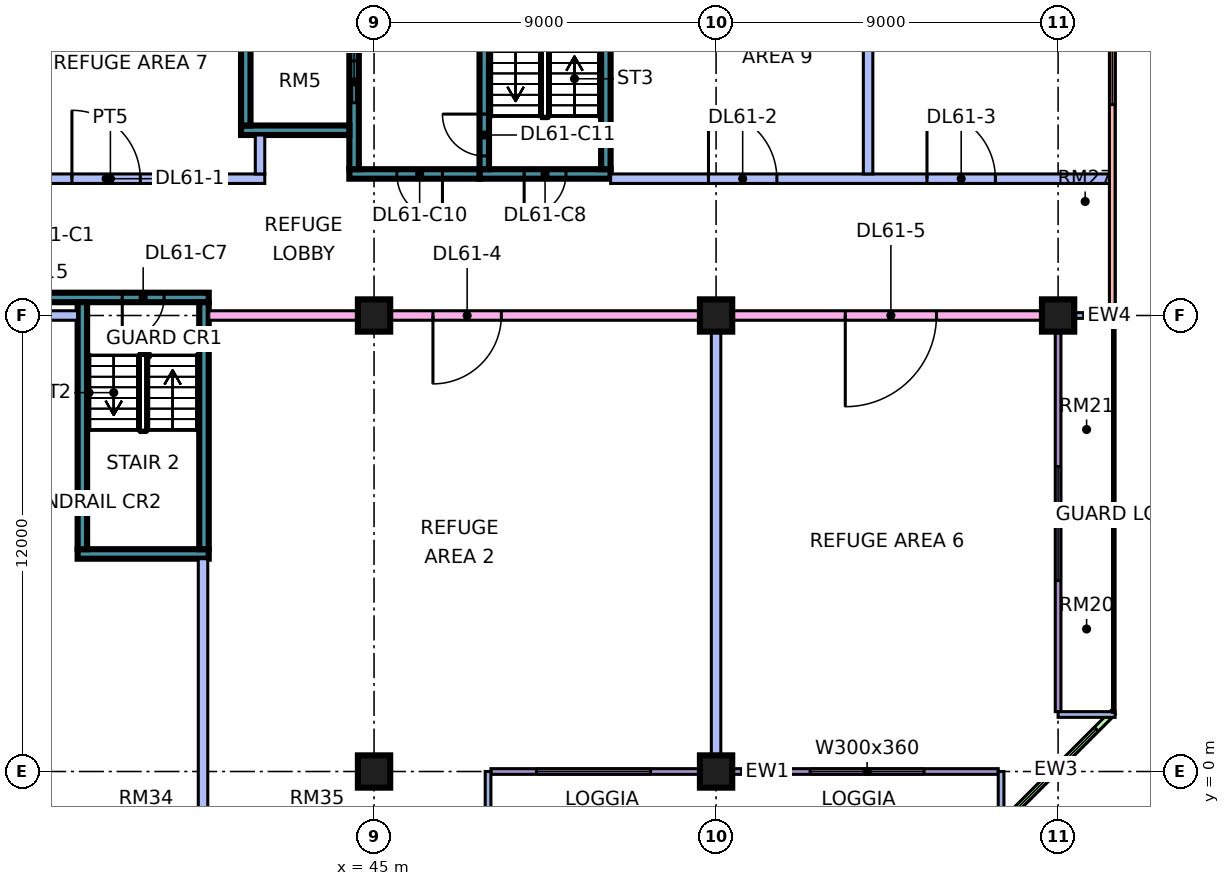
"""IFC4 building model, lengths in metres.
Left out: names, types, materials, properties, quantities, classifications, styles, units other than length and angle.
Written with IfcOpenShell. Run it as: python <this file> out.ifc"""

import sys

from ifc_helpers import new_model, si_unit, direction, frame, frame_2d, origin, origin_2d, place, context, subcontext, project, spatial, rectangle, extrude, element, fill, save


model = new_model("IFC4")
c1 = context("Model", 3, precision=1e-05, world=origin(), true_north=direction((0.0, 1.0)))
c2 = subcontext(c1, "Body", "Model", "MODEL_VIEW")
j1 = project(units=[si_unit("LENGTHUNIT", "METRE"), si_unit("PLANEANGLEUNIT", "RADIAN")], contexts=[c1])
p1 = place(None, origin())
s1 = spatial("IfcSite", under=j1, at=p1, CompositionType="ELEMENT")
p2 = place(p1, origin())
s2 = spatial("IfcBuilding", under=s1, at=p2, CompositionType="ELEMENT")
p3 = place(p2, frame((0.0, 0.0, 256.65)))
s3 = spatial("IfcBuildingStorey", under=s2, at=p3, CompositionType="ELEMENT", Elevation=256.65)
for number, where, z_axis, x_axis in (
    (1, (45.0, 0.0, 0.0), (0.0, 0.0, 1.0), (1.0, 0.0, 0.0)),
    (2, (45.0, 12.0, 0.0), (0.0, 0.0, 1.0), (1.0, 0.0, 0.0)),
    (3, (54.0, 0.0, 0.0), (0.0, 0.0, 1.0), (1.0, 0.0, 0.0)),
    (4, (54.0, 12.0, 0.0), (0.0, 0.0, 1.0), (1.0, 0.0, 0.0)),
    (5, (63.0, 12.0, 0.0), (0.0, 0.0, 1.0), (1.0, 0.0, 0.0)),
):
    element("IfcColumn", number, at=place(p3, frame(where, z_axis=z_axis, x_axis=x_axis)), inside=s3, PredefinedType="COLUMN", context=c2, shape_type="SweptSolid", body=[
        extrude(rectangle(XDim=0.85, YDim=0.85, at=origin_2d()), origin(), (0.0, 0.0, 1.0), 5.5),
    ])
p4 = place(p3, frame((37.2, 5.725, 0.0), z_axis=(0.0, 0.0, 1.0), x_axis=(1.0, 0.0, 0.0)))
e6 = element("IfcWall", 6, at=p4, inside=s3, PredefinedType="SHEAR", context=c2, shape_type="SweptSolid", body=[
    extrude(rectangle(XDim=3.45, YDim=0.25, at=frame_2d((1.725, 0.0))), origin(), (0.0, 0.0, 1.0), 5.5),
])
p5 = place(p3, frame((36.425, 12.475, 0.0), z_axis=(0.0, 0.0, 1.0), x_axis=(1.0, 0.0, 0.0)))
e7 = element("IfcWall", 7, at=p5, inside=s3, PredefinedType="SHEAR", context=c2, shape_type="SweptSolid", body=[
    extrude(rectangle(XDim=4.225, YDim=0.25, at=frame_2d((2.112, 0.0))), origin(), (0.0, 0.0, 1.0), 5.5),
])
p6 = place(p5, frame((1.95, 0.0, 0.0)))
e8 = element("IfcOpeningElement", 8, at=p6, cuts=e7, PredefinedType="OPENING", context=c2, shape_type="SweptSolid", body=[
    extrude(rectangle(XDim=1.1, YDim=2.2, at=frame_2d((0.55, 1.1))), frame((0.0, 0.135, 0.0), z_axis=(0.0, -1.0, 0.0), x_axis=(1.0, 0.0, 0.0)), (0.0, 0.0, 1.0), 0.27),
])
for number, where, z_axis, x_axis in (
    (9, (37.325, 5.85, 0.0), (0.0, 0.0, 1.0), (0.0, 1.0, 0.0)),
    (10, (40.525, 5.85, 0.0), (0.0, 0.0, 1.0), (0.0, 1.0, 0.0)),
):
    element("IfcWall", number, at=place(p3, frame(where, z_axis=z_axis, x_axis=x_axis)), inside=s3, PredefinedType="SHEAR", context=c2, shape_type="SweptSolid", body=[
        extrude(rectangle(XDim=6.5, YDim=0.25, at=frame_2d((3.25, 0.0))), origin(), (0.0, 0.0, 1.0), 5.5),
    ])
p7 = place(p3, frame((47.775, 15.725, 0.0), z_axis=(0.0, 0.0, 1.0), x_axis=(1.0, 0.0, 0.0)))
e11 = element("IfcWall", 11, at=p7, inside=s3, PredefinedType="SHEAR", context=c2, shape_type="SweptSolid", body=[
    extrude(rectangle(XDim=3.45, YDim=0.25, at=frame_2d((1.725, 0.0))), origin(), (0.0, 0.0, 1.0), 5.5),
])
p8 = place(p7, frame((1.175, 0.0, 0.0)))
e12 = element("IfcOpeningElement", 12, at=p8, cuts=e11, PredefinedType="OPENING", context=c2, shape_type="SweptSolid", body=[
    extrude(rectangle(XDim=1.1, YDim=2.2, at=frame_2d((0.55, 1.1))), frame((0.0, 0.135, 0.0), z_axis=(0.0, -1.0, 0.0), x_axis=(1.0, 0.0, 0.0)), (0.0, 0.0, 1.0), 0.27),
])
p9 = place(p3, frame((47.9, 15.85, 0.0), z_axis=(0.0, 0.0, 1.0), x_axis=(0.0, 1.0, 0.0)))
e13 = element("IfcWall", 13, at=p9, inside=s3, PredefinedType="SHEAR", context=c2, shape_type="SweptSolid", body=[
    extrude(rectangle(XDim=6.5, YDim=0.25, at=frame_2d((3.25, 0.0))), origin(), (0.0, 0.0, 1.0), 5.5),
])
p10 = place(p9, frame((0.35, 0.0, 0.0)))
e14 = element("IfcOpeningElement", 14, at=p10, cuts=e13, PredefinedType="OPENING", context=c2, shape_type="SweptSolid", body=[
    extrude(rectangle(XDim=1.1, YDim=2.2, at=frame_2d((0.55, 1.1))), frame((0.0, 0.135, 0.0), z_axis=(0.0, -1.0, 0.0), x_axis=(1.0, 0.0, 0.0)), (0.0, 0.0, 1.0), 0.27),
])
p11 = place(p3, frame((51.1, 15.85, 0.0), z_axis=(0.0, 0.0, 1.0), x_axis=(0.0, 1.0, 0.0)))
e15 = element("IfcWall", 15, at=p11, inside=s3, PredefinedType="SHEAR", context=c2, shape_type="SweptSolid", body=[
    extrude(rectangle(XDim=6.5, YDim=0.25, at=frame_2d((3.25, 0.0))), origin(), (0.0, 0.0, 1.0), 5.5),
])
p12 = place(p3, frame((44.35, 15.725, 0.0), z_axis=(0.0, 0.0, 1.0), x_axis=(1.0, 0.0, 0.0)))
e16 = element("IfcWall", 16, at=p12, inside=s3, PredefinedType="SHEAR", context=c2, shape_type="SweptSolid", body=[
    extrude(rectangle(XDim=3.425, YDim=0.25, at=frame_2d((1.712, 0.0))), origin(), (0.0, 0.0, 1.0), 5.5),
])
p13 = place(p12, frame((1.25, 0.0, 0.0)))
e17 = element("IfcOpeningElement", 17, at=p13, cuts=e16, PredefinedType="OPENING", context=c2, shape_type="SweptSolid", body=[
    extrude(rectangle(XDim=1.2, YDim=2.2, at=frame_2d((0.6, 1.1))), frame((0.0, 0.135, 0.0), z_axis=(0.0, -1.0, 0.0), x_axis=(1.0, 0.0, 0.0)), (0.0, 0.0, 1.0), 0.27),
])
p14 = place(p3, frame((44.475, 15.85, 0.0), z_axis=(0.0, 0.0, 1.0), x_axis=(0.0, 1.0, 0.0)))
e18 = element("IfcWall", 18, at=p14, inside=s3, PredefinedType="SHEAR", context=c2, shape_type="SweptSolid", body=[
    extrude(rectangle(XDim=6.5, YDim=0.25, at=frame_2d((3.25, 0.0))), origin(), (0.0, 0.0, 1.0), 5.5),
])
p15 = place(p14, frame((1.75, 0.0, 0.0)))
e19 = element("IfcOpeningElement", 19, at=p15, cuts=e18, PredefinedType="OPENING", context=c2, shape_type="SweptSolid", body=[
    extrude(rectangle(XDim=1.1, YDim=2.2, at=frame_2d((0.55, 1.1))), frame((0.0, 0.135, 0.0), z_axis=(0.0, -1.0, 0.0), x_axis=(1.0, 0.0, 0.0)), (0.0, 0.0, 1.0), 0.27),
])
p16 = place(p14, frame((4.3, 0.0, 0.0)))
e20 = element("IfcOpeningElement", 20, at=p16, cuts=e18, PredefinedType="OPENING", context=c2, shape_type="SweptSolid", body=[
    extrude(rectangle(XDim=1.1, YDim=2.2, at=frame_2d((0.55, 1.1))), frame((0.0, 0.135, 0.0), z_axis=(0.0, -1.0, 0.0), x_axis=(1.0, 0.0, 0.0)), (0.0, 0.0, 1.0), 0.27),
])
p17 = place(p3, frame((41.5, 16.875, 0.0), z_axis=(0.0, 0.0, 1.0), x_axis=(1.0, 0.0, 0.0)))
e21 = element("IfcWall", 21, at=p17, inside=s3, PredefinedType="SHEAR", context=c2, shape_type="SweptSolid", body=[
    extrude(rectangle(XDim=2.85, YDim=0.25, at=frame_2d((1.425, 0.0))), origin(), (0.0, 0.0, 1.0), 5.5),
])
p18 = place(p3, frame((41.625, 17.0, 0.0), z_axis=(0.0, 0.0, 1.0), x_axis=(0.0, 1.0, 0.0)))
e22 = element("IfcWall", 22, at=p18, inside=s3, PredefinedType="SHEAR", context=c2, shape_type="SweptSolid", body=[
    extrude(rectangle(XDim=2.3, YDim=0.25, at=frame_2d((1.15, 0.0))), origin(), (0.0, 0.0, 1.0), 5.5),
])
p19 = place(p3, frame((48.075, 0.0, 0.0), z_axis=(0.0, 0.0, 1.0), x_axis=(1.0, 0.0, 0.0)))
e23 = element("IfcWall", 23, at=p19, inside=s3, PredefinedType="SOLIDWALL", context=c2, shape_type="SweptSolid", body=[
    extrude(rectangle(XDim=13.35, YDim=0.15, at=frame_2d((6.675, 0.0))), origin(), (0.0, 0.0, 1.0), 5.05),
])
p20 = place(p19, frame((1.2, 0.0, 0.45)))
e24 = element("IfcOpeningElement", 24, at=p20, cuts=e23, PredefinedType="OPENING", context=c2, shape_type="SweptSolid", body=[
    extrude(rectangle(XDim=3.0, YDim=3.6, at=frame_2d((1.5, 1.8))), frame((0.0, 0.085, 0.0), z_axis=(0.0, -1.0, 0.0), x_axis=(1.0, 0.0, 0.0)), (0.0, 0.0, 1.0), 0.17),
])
p21 = place(p19, frame((8.4, 0.0, 0.45)))
e25 = element("IfcOpeningElement", 25, at=p21, cuts=e23, PredefinedType="OPENING", context=c2, shape_type="SweptSolid", body=[
    extrude(rectangle(XDim=3.0, YDim=3.6, at=frame_2d((1.5, 1.8))), frame((0.0, 0.085, 0.0), z_axis=(0.0, -1.0, 0.0), x_axis=(1.0, 0.0, 0.0)), (0.0, 0.0, 1.0), 0.17),
])
for number, where, z_axis, x_axis in (
    (26, (48.0, -1.5, 0.0), (0.0, 0.0, 1.0), (0.0, 1.0, 0.0)),
    (27, (61.5, -1.5, 0.0), (0.0, 0.0, 1.0), (0.0, 1.0, 0.0)),
):
    element("IfcWall", number, at=place(p3, frame(where, z_axis=z_axis, x_axis=x_axis)), inside=s3, PredefinedType="SOLIDWALL", context=c2, shape_type="SweptSolid", body=[
        extrude(rectangle(XDim=1.5, YDim=0.15, at=frame_2d((0.75, 0.0))), origin(), (0.0, 0.0, 1.0), 5.05),
    ])
p22 = place(p3, frame((61.447, -1.447, 0.0), z_axis=(0.0, 0.0, 1.0), x_axis=(0.707106781187, 0.707106781187, 0.0)))
e28 = element("IfcWall", 28, at=p22, inside=s3, PredefinedType="SOLIDWALL", context=c2, shape_type="SweptSolid", body=[
    extrude(rectangle(XDim=4.243, YDim=0.15, at=frame_2d((2.121, 0.0))), origin(), (0.0, 0.0, 1.0), 5.05),
])
p23 = place(p22, frame((0.621, 0.0, 0.45)))
e29 = element("IfcOpeningElement", 29, at=p23, cuts=e28, PredefinedType="OPENING", context=c2, shape_type="SweptSolid", body=[
    extrude(rectangle(XDim=3.0, YDim=3.6, at=frame_2d((1.5, 1.8))), frame((0.0, 0.085, 0.0), z_axis=(0.0, -1.0, 0.0), x_axis=(1.0, 0.0, 0.0)), (0.0, 0.0, 1.0), 0.17),
])
p24 = place(p3, frame((63.0, 1.575, 0.0), z_axis=(0.0, 0.0, 1.0), x_axis=(0.0, 1.0, 0.0)))
e30 = element("IfcWall", 30, at=p24, inside=s3, PredefinedType="SOLIDWALL", context=c2, shape_type="SweptSolid", body=[
    extrude(rectangle(XDim=10.35, YDim=0.15, at=frame_2d((5.175, 0.0))), origin(), (0.0, 0.0, 1.0), 5.05),
])
p25 = place(p24, frame((3.45, 0.0, 0.45)))
e31 = element("IfcOpeningElement", 31, at=p25, cuts=e30, PredefinedType="OPENING", context=c2, shape_type="SweptSolid", body=[
    extrude(rectangle(XDim=3.0, YDim=3.6, at=frame_2d((1.5, 1.8))), frame((0.0, 0.085, 0.0), z_axis=(0.0, -1.0, 0.0), x_axis=(1.0, 0.0, 0.0)), (0.0, 0.0, 1.0), 0.17),
])
for number, where, z_axis, x_axis in (
    (32, (64.5, 1.5, 0.0), (0.0, 0.0, 1.0), (-1.0, 0.0, 0.0)),
    (33, (64.5, 12.0, 0.0), (0.0, 0.0, 1.0), (-1.0, 0.0, 0.0)),
):
    element("IfcWall", number, at=place(p3, frame(where, z_axis=z_axis, x_axis=x_axis)), inside=s3, PredefinedType="SOLIDWALL", context=c2, shape_type="SweptSolid", body=[
        extrude(rectangle(XDim=1.5, YDim=0.15, at=frame_2d((0.75, 0.0))), origin(), (0.0, 0.0, 1.0), 5.05),
    ])
p26 = place(p3, frame((64.425, 12.075, 0.0), z_axis=(0.0, 0.0, 1.0), x_axis=(0.0, 1.0, 0.0)))
e34 = element("IfcWall", 34, at=p26, inside=s3, PredefinedType="SOLIDWALL", context=c2, shape_type="SweptSolid", body=[
    extrude(rectangle(XDim=10.425, YDim=0.15, at=frame_2d((5.212, 0.0))), origin(), (0.0, 0.0, 1.0), 5.05),
])
p27 = place(p26, frame((5.475, 0.0, 0.45)))
e35 = element("IfcOpeningElement", 35, at=p27, cuts=e34, PredefinedType="OPENING", context=c2, shape_type="SweptSolid", body=[
    extrude(rectangle(XDim=3.0, YDim=3.6, at=frame_2d((1.5, 1.8))), frame((0.0, 0.085, 0.0), z_axis=(0.0, -1.0, 0.0), x_axis=(1.0, 0.0, 0.0)), (0.0, 0.0, 1.0), 0.17),
])
p28 = place(p3, frame((34.0, 12.0, 0.0), z_axis=(0.0, 0.0, 1.0), x_axis=(1.0, 0.0, 0.0)))
e36 = element("IfcWall", 36, at=p28, inside=s3, PredefinedType="PARTITIONING", context=c2, shape_type="SweptSolid", body=[
    extrude(rectangle(XDim=3.2, YDim=0.25, at=frame_2d((1.6, 0.0))), origin(), (0.0, 0.0, 1.0), 5.05),
])
p29 = place(p28, frame((0.15, 0.0, 0.0)))
e37 = element("IfcOpeningElement", 37, at=p29, cuts=e36, PredefinedType="OPENING", context=c2, shape_type="SweptSolid", body=[
    extrude(rectangle(XDim=1.2, YDim=2.1, at=frame_2d((0.6, 1.05))), frame((0.0, 0.135, 0.0), z_axis=(0.0, -1.0, 0.0), x_axis=(1.0, 0.0, 0.0)), (0.0, 0.0, 1.0), 0.27),
])
p30 = place(p3, frame((34.0, 15.6, 0.0), z_axis=(0.0, 0.0, 1.0), x_axis=(1.0, 0.0, 0.0)))
e38 = element("IfcWall", 38, at=p30, inside=s3, PredefinedType="PARTITIONING", context=c2, shape_type="SweptSolid", body=[
    extrude(rectangle(XDim=8.125, YDim=0.25, at=frame_2d((4.062, 0.0))), origin(), (0.0, 0.0, 1.0), 5.05),
])
p31 = place(p30, frame((3.05, 0.0, 0.0)))
e39 = element("IfcOpeningElement", 39, at=p31, cuts=e38, PredefinedType="OPENING", context=c2, shape_type="SweptSolid", body=[
    extrude(rectangle(XDim=1.8, YDim=2.1, at=frame_2d((0.9, 1.05))), frame((0.0, 0.135, 0.0), z_axis=(0.0, -1.0, 0.0), x_axis=(1.0, 0.0, 0.0)), (0.0, 0.0, 1.0), 0.27),
])
p32 = place(p3, frame((40.5, -1.35, 0.0), z_axis=(0.0, 0.0, 1.0), x_axis=(0.0, 1.0, 0.0)))
e40 = element("IfcWall", 40, at=p32, inside=s3, PredefinedType="PARTITIONING", context=c2, shape_type="SweptSolid", body=[
    extrude(rectangle(XDim=6.95, YDim=0.25, at=frame_2d((3.475, 0.0))), origin(), (0.0, 0.0, 1.0), 5.05),
])
p33 = place(p3, frame((40.65, 12.0, 0.0), z_axis=(0.0, 0.0, 1.0), x_axis=(1.0, 0.0, 0.0)))
e41 = element("IfcWall", 41, at=p33, inside=s3, PredefinedType="PARTITIONING", context=c2, shape_type="SweptSolid", body=[
    extrude(rectangle(XDim=22.35, YDim=0.25, at=frame_2d((11.175, 0.0))), origin(), (0.0, 0.0, 1.0), 2.45),
])
p34 = place(p33, frame((5.9, 0.0, 0.0)))
e42 = element("IfcOpeningElement", 42, at=p34, cuts=e41, PredefinedType="OPENING", context=c2, shape_type="SweptSolid", body=[
    extrude(rectangle(XDim=1.8, YDim=2.1, at=frame_2d((0.9, 1.05))), frame((0.0, 0.135, 0.0), z_axis=(0.0, -1.0, 0.0), x_axis=(1.0, 0.0, 0.0)), (0.0, 0.0, 1.0), 0.27),
])
p35 = place(p33, frame((16.75, 0.0, 0.0)))
e43 = element("IfcOpeningElement", 43, at=p35, cuts=e41, PredefinedType="OPENING", context=c2, shape_type="SweptSolid", body=[
    extrude(rectangle(XDim=2.4, YDim=2.1, at=frame_2d((1.2, 1.05))), frame((0.0, 0.135, 0.0), z_axis=(0.0, -1.0, 0.0), x_axis=(1.0, 0.0, 0.0)), (0.0, 0.0, 1.0), 0.27),
])
p36 = place(p3, frame((42.0, 15.725, 0.0), z_axis=(0.0, 0.0, 1.0), x_axis=(0.0, 1.0, 0.0)))
e44 = element("IfcWall", 44, at=p36, inside=s3, PredefinedType="PARTITIONING", context=c2, shape_type="SweptSolid", body=[
    extrude(rectangle(XDim=1.025, YDim=0.25, at=frame_2d((0.512, 0.0))), origin(), (0.0, 0.0, 1.0), 5.05),
])
p37 = place(p3, frame((51.225, 15.6, 0.0), z_axis=(0.0, 0.0, 1.0), x_axis=(1.0, 0.0, 0.0)))
e45 = element("IfcWall", 45, at=p37, inside=s3, PredefinedType="PARTITIONING", context=c2, shape_type="SweptSolid", body=[
    extrude(rectangle(XDim=13.125, YDim=0.25, at=frame_2d((6.562, 0.0))), origin(), (0.0, 0.0, 1.0), 5.05),
])
p38 = place(p37, frame((2.575, 0.0, 0.0)))
e46 = element("IfcOpeningElement", 46, at=p38, cuts=e45, PredefinedType="OPENING", context=c2, shape_type="SweptSolid", body=[
    extrude(rectangle(XDim=1.8, YDim=2.1, at=frame_2d((0.9, 1.05))), frame((0.0, 0.135, 0.0), z_axis=(0.0, -1.0, 0.0), x_axis=(1.0, 0.0, 0.0)), (0.0, 0.0, 1.0), 0.27),
])
p39 = place(p37, frame((8.325, 0.0, 0.0)))
e47 = element("IfcOpeningElement", 47, at=p39, cuts=e45, PredefinedType="OPENING", context=c2, shape_type="SweptSolid", body=[
    extrude(rectangle(XDim=1.8, YDim=2.1, at=frame_2d((0.9, 1.05))), frame((0.0, 0.135, 0.0), z_axis=(0.0, -1.0, 0.0), x_axis=(1.0, 0.0, 0.0)), (0.0, 0.0, 1.0), 0.27),
])
p40 = place(p3, frame((54.0, 0.074, 0.0), z_axis=(0.0, 0.0, 1.0), x_axis=(0.0, 1.0, 0.0)))
e48 = element("IfcWall", 48, at=p40, inside=s3, PredefinedType="PARTITIONING", context=c2, shape_type="SweptSolid", body=[
    extrude(rectangle(XDim=11.801, YDim=0.25, at=frame_2d((5.9, 0.0))), origin(), (0.0, 0.0, 1.0), 5.05),
])
p41 = place(p3, frame((58.0, 15.725, 0.0), z_axis=(0.0, 0.0, 1.0), x_axis=(0.0, 1.0, 0.0)))
e49 = element("IfcWall", 49, at=p41, inside=s3, PredefinedType="PARTITIONING", context=c2, shape_type="SweptSolid", body=[
    extrude(rectangle(XDim=8.201, YDim=0.25, at=frame_2d((4.101, 0.0))), origin(), (0.0, 0.0, 1.0), 5.05),
])
p42 = place(p20, origin())
e50 = element("IfcWindow", 50, at=p42, inside=s3, PartitioningType="SINGLE_PANEL", PredefinedType="WINDOW", context=c2, shape_type="SweptSolid", body=[
    extrude(rectangle(XDim=3.0, YDim=3.6, at=frame_2d((1.5, 1.8))), frame((0.0, 0.03, 0.0), z_axis=(0.0, -1.0, 0.0), x_axis=(1.0, 0.0, 0.0)), (0.0, 0.0, 1.0), 0.06),
])
fill(e24, e50)
p43 = place(p21, origin())
e51 = element("IfcWindow", 51, at=p43, inside=s3, PartitioningType="SINGLE_PANEL", PredefinedType="WINDOW", context=c2, shape_type="SweptSolid", body=[
    extrude(rectangle(XDim=3.0, YDim=3.6, at=frame_2d((1.5, 1.8))), frame((0.0, 0.03, 0.0), z_axis=(0.0, -1.0, 0.0), x_axis=(1.0, 0.0, 0.0)), (0.0, 0.0, 1.0), 0.06),
])
fill(e25, e51)
p44 = place(p23, origin())
e52 = element("IfcWindow", 52, at=p44, inside=s3, PartitioningType="SINGLE_PANEL", PredefinedType="WINDOW", context=c2, shape_type="SweptSolid", body=[
    extrude(rectangle(XDim=3.0, YDim=3.6, at=frame_2d((1.5, 1.8))), frame((0.0, 0.03, 0.0), z_axis=(0.0, -1.0, 0.0), x_axis=(1.0, 0.0, 0.0)), (0.0, 0.0, 1.0), 0.06),
])
fill(e29, e52)
p45 = place(p25, origin())
e53 = element("IfcWindow", 53, at=p45, inside=s3, PartitioningType="SINGLE_PANEL", PredefinedType="WINDOW", context=c2, shape_type="SweptSolid", body=[
    extrude(rectangle(XDim=3.0, YDim=3.6, at=frame_2d((1.5, 1.8))), frame((0.0, 0.03, 0.0), z_axis=(0.0, -1.0, 0.0), x_axis=(1.0, 0.0, 0.0)), (0.0, 0.0, 1.0), 0.06),
])
fill(e31, e53)
p46 = place(p27, origin())
e54 = element("IfcWindow", 54, at=p46, inside=s3, PartitioningType="SINGLE_PANEL", PredefinedType="WINDOW", context=c2, shape_type="SweptSolid", body=[
    extrude(rectangle(XDim=3.0, YDim=3.6, at=frame_2d((1.5, 1.8))), frame((0.0, 0.03, 0.0), z_axis=(0.0, -1.0, 0.0), x_axis=(1.0, 0.0, 0.0)), (0.0, 0.0, 1.0), 0.06),
])
fill(e35, e54)
p47 = place(p6, frame((1.1, 0.0, 0.0), z_axis=(0.0, 0.0, 1.0), x_axis=(-1.0, 0.0, 0.0)))
e55 = element("IfcDoor", 55, at=p47, inside=s3, OperationType="SINGLE_SWING_LEFT", PredefinedType="DOOR", context=c2, shape_type="SweptSolid", body=[
    extrude(rectangle(XDim=1.1, YDim=2.2, at=frame_2d((0.55, 1.1))), frame((0.0, 0.025, 0.0), z_axis=(0.0, -1.0, 0.0), x_axis=(1.0, 0.0, 0.0)), (0.0, 0.0, 1.0), 0.05),
])
fill(e8, e55)
p48 = place(p8, frame((1.1, 0.0, 0.0), z_axis=(0.0, 0.0, 1.0), x_axis=(-1.0, 0.0, 0.0)))
e56 = element("IfcDoor", 56, at=p48, inside=s3, OperationType="SINGLE_SWING_LEFT", PredefinedType="DOOR", context=c2, shape_type="SweptSolid", body=[
    extrude(rectangle(XDim=1.1, YDim=2.2, at=frame_2d((0.55, 1.1))), frame((0.0, 0.025, 0.0), z_axis=(0.0, -1.0, 0.0), x_axis=(1.0, 0.0, 0.0)), (0.0, 0.0, 1.0), 0.05),
])
fill(e12, e56)
p49 = place(p13, origin())
e57 = element("IfcDoor", 57, at=p49, inside=s3, OperationType="SINGLE_SWING_RIGHT", PredefinedType="DOOR", context=c2, shape_type="SweptSolid", body=[
    extrude(rectangle(XDim=1.2, YDim=2.2, at=frame_2d((0.6, 1.1))), frame((0.0, 0.025, 0.0), z_axis=(0.0, -1.0, 0.0), x_axis=(1.0, 0.0, 0.0)), (0.0, 0.0, 1.0), 0.05),
])
fill(e17, e57)
p50 = place(p10, frame((1.1, 0.0, 0.0), z_axis=(0.0, 0.0, 1.0), x_axis=(-1.0, 0.0, 0.0)))
e58 = element("IfcDoor", 58, at=p50, inside=s3, OperationType="SINGLE_SWING_RIGHT", PredefinedType="DOOR", context=c2, shape_type="SweptSolid", body=[
    extrude(rectangle(XDim=1.1, YDim=2.2, at=frame_2d((0.55, 1.1))), frame((0.0, 0.025, 0.0), z_axis=(0.0, -1.0, 0.0), x_axis=(1.0, 0.0, 0.0)), (0.0, 0.0, 1.0), 0.05),
])
fill(e14, e58)
p51 = place(p15, origin())
e59 = element("IfcDoor", 59, at=p51, inside=s3, OperationType="DOUBLE_DOOR_SLIDING", PredefinedType="DOOR", context=c2, shape_type="SweptSolid", body=[
    extrude(rectangle(XDim=1.1, YDim=2.2, at=frame_2d((0.55, 1.1))), frame((0.0, 0.025, 0.0), z_axis=(0.0, -1.0, 0.0), x_axis=(1.0, 0.0, 0.0)), (0.0, 0.0, 1.0), 0.05),
])
fill(e19, e59)
p52 = place(p31, origin())
e60 = element("IfcDoor", 60, at=p52, inside=s3, OperationType="DOUBLE_DOOR_SINGLE_SWING", PredefinedType="DOOR", context=c2, shape_type="SweptSolid", body=[
    extrude(rectangle(XDim=1.8, YDim=2.1, at=frame_2d((0.9, 1.05))), frame((0.0, 0.025, 0.0), z_axis=(0.0, -1.0, 0.0), x_axis=(1.0, 0.0, 0.0)), (0.0, 0.0, 1.0), 0.05),
])
fill(e39, e60)
p53 = place(p38, origin())
e61 = element("IfcDoor", 61, at=p53, inside=s3, OperationType="DOUBLE_DOOR_SINGLE_SWING", PredefinedType="DOOR", context=c2, shape_type="SweptSolid", body=[
    extrude(rectangle(XDim=1.8, YDim=2.1, at=frame_2d((0.9, 1.05))), frame((0.0, 0.025, 0.0), z_axis=(0.0, -1.0, 0.0), x_axis=(1.0, 0.0, 0.0)), (0.0, 0.0, 1.0), 0.05),
])
fill(e46, e61)
p54 = place(p39, origin())
e62 = element("IfcDoor", 62, at=p54, inside=s3, OperationType="DOUBLE_DOOR_SINGLE_SWING", PredefinedType="DOOR", context=c2, shape_type="SweptSolid", body=[
    extrude(rectangle(XDim=1.8, YDim=2.1, at=frame_2d((0.9, 1.05))), frame((0.0, 0.025, 0.0), z_axis=(0.0, -1.0, 0.0), x_axis=(1.0, 0.0, 0.0)), (0.0, 0.0, 1.0), 0.05),
])
fill(e47, e62)
p55 = place(p34, frame((1.8, 0.0, 0.0), z_axis=(0.0, 0.0, 1.0), x_axis=(-1.0, 0.0, 0.0)))
e63 = element("IfcDoor", 63, at=p55, inside=s3, OperationType="DOUBLE_DOOR_SINGLE_SWING", PredefinedType="DOOR", context=c2, shape_type="SweptSolid", body=[
    extrude(rectangle(XDim=1.8, YDim=2.1, at=frame_2d((0.9, 1.05))), frame((0.0, 0.025, 0.0), z_axis=(0.0, -1.0, 0.0), x_axis=(1.0, 0.0, 0.0)), (0.0, 0.0, 1.0), 0.05),
])
fill(e42, e63)
p56 = place(p35, frame((2.4, 0.0, 0.0), z_axis=(0.0, 0.0, 1.0), x_axis=(-1.0, 0.0, 0.0)))
e64 = element("IfcDoor", 64, at=p56, inside=s3, OperationType="DOUBLE_DOOR_SINGLE_SWING", PredefinedType="DOOR", context=c2, shape_type="SweptSolid", body=[
    extrude(rectangle(XDim=2.4, YDim=2.1, at=frame_2d((1.2, 1.05))), frame((0.0, 0.025, 0.0), z_axis=(0.0, -1.0, 0.0), x_axis=(1.0, 0.0, 0.0)), (0.0, 0.0, 1.0), 0.05),
])
fill(e43, e64)
save(model, sys.argv[1])
